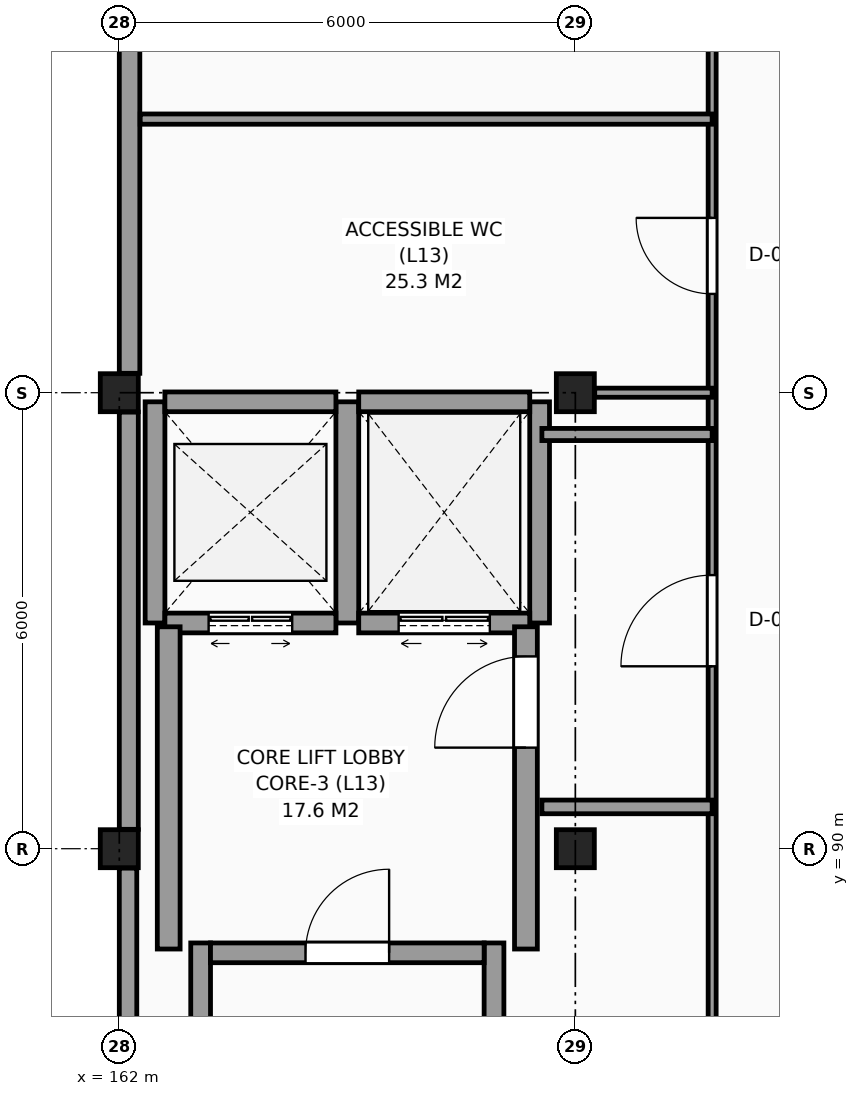
"""IFC4 building model, lengths in metres.
Left out: names, types, materials, properties, quantities, classifications, styles, units other than length and angle.
Written with IfcOpenShell. Run it as: python <this file> out.ifc"""

import sys

from ifc_helpers import new_model, si_unit, direction, frame, frame_2d, origin, origin_2d, place, context, subcontext, project, spatial, rectangle, extrude, element, fill, save


model = new_model("IFC4")
c1 = context("Model", 3, precision=1e-05, world=origin(), true_north=direction((0.0, 1.0)))
c2 = subcontext(c1, "Body", "Model", "MODEL_VIEW")
j1 = project(units=[si_unit("LENGTHUNIT", "METRE"), si_unit("PLANEANGLEUNIT", "RADIAN")], contexts=[c1])
p1 = place(None, origin())
s1 = spatial("IfcSite", under=j1, at=p1, CompositionType="ELEMENT")
p2 = place(p1, origin())
s2 = spatial("IfcBuilding", under=s1, at=p2, CompositionType="ELEMENT")
p3 = place(p2, frame((0.0, 0.0, 51.3)))
s3 = spatial("IfcBuildingStorey", under=s2, at=p3, CompositionType="ELEMENT", Elevation=51.3)
for number, where, z_axis, x_axis in (
    (1, (162.0, 90.0, 0.0), (0.0, 0.0, 1.0), (1.0, 0.0, 0.0)),
    (2, (162.0, 96.0, 0.0), (0.0, 0.0, 1.0), (1.0, 0.0, 0.0)),
    (3, (168.0, 90.0, 0.0), (0.0, 0.0, 1.0), (1.0, 0.0, 0.0)),
    (4, (168.0, 96.0, 0.0), (0.0, 0.0, 1.0), (1.0, 0.0, 0.0)),
):
    element("IfcColumn", number, at=place(p3, frame(where, z_axis=z_axis, x_axis=x_axis)), inside=s3, PredefinedType="COLUMN", context=c2, shape_type="SweptSolid", body=[
        extrude(rectangle(XDim=0.5, YDim=0.5, at=origin_2d()), origin(), (0.0, 0.0, 1.0), 3.3),
    ])
p4 = place(p3, frame((162.135, 101.745, 0.0), z_axis=(0.0, 0.0, 1.0), x_axis=(0.0, -1.0, 0.0)))
e5 = element("IfcWall", 5, at=p4, inside=s3, PredefinedType="SOLIDWALL", context=c2, shape_type="SweptSolid", body=[
    extrude(rectangle(XDim=5.49, YDim=0.27, at=frame_2d((2.745, 0.0))), origin(), (0.0, 0.0, 1.0), 2.46),
])
p5 = place(p3, frame((162.125, 95.745, 0.0), z_axis=(0.0, 0.0, 1.0), x_axis=(0.0, -1.0, 0.0)))
e6 = element("IfcWall", 6, at=p5, inside=s3, PredefinedType="SOLIDWALL", context=c2, shape_type="SweptSolid", body=[
    extrude(rectangle(XDim=5.49, YDim=0.25, at=frame_2d((2.745, 0.0))), origin(), (0.0, 0.0, 1.0), 2.61),
])
p6 = place(p3, frame((162.115, 89.745, 0.0), z_axis=(0.0, 0.0, 1.0), x_axis=(0.0, -1.0, 0.0)))
e7 = element("IfcWall", 7, at=p6, inside=s3, PredefinedType="SOLIDWALL", context=c2, shape_type="SweptSolid", body=[
    extrude(rectangle(XDim=5.49, YDim=0.23, at=frame_2d((2.745, 0.0))), origin(), (0.0, 0.0, 1.0), 2.46),
])
for number, where, z_axis, x_axis in (
    (8, (163.07, 78.04, 0.0), (0.0, 0.0, 1.0), (0.0, 1.0, 0.0)),
    (9, (166.93, 78.04, 0.0), (0.0, 0.0, 1.0), (0.0, 1.0, 0.0)),
):
    element("IfcWall", number, at=place(p3, frame(where, z_axis=z_axis, x_axis=x_axis)), inside=s3, PredefinedType="SHEAR", context=c2, shape_type="SweptSolid", body=[
        extrude(rectangle(XDim=10.72, YDim=0.26, at=frame_2d((5.36, 0.0))), origin(), (0.0, 0.0, 1.0), 3.3),
    ])
p7 = place(p3, frame((163.2, 88.63, 0.0), z_axis=(0.0, 0.0, 1.0), x_axis=(1.0, 0.0, 0.0)))
e10 = element("IfcWall", 10, at=p7, inside=s3, PredefinedType="SHEAR", context=c2, shape_type="SweptSolid", body=[
    extrude(rectangle(XDim=3.6, YDim=0.26, at=frame_2d((1.8, 0.0))), origin(), (0.0, 0.0, 1.0), 3.3),
])
p8 = place(p7, frame((1.25, 0.0, 0.0)))
e11 = element("IfcOpeningElement", 11, at=p8, cuts=e10, PredefinedType="OPENING", context=c2, shape_type="SweptSolid", body=[
    extrude(rectangle(XDim=1.1, YDim=2.15, at=frame_2d((0.55, 1.075))), frame((0.0, 0.14, 0.0), z_axis=(0.0, -1.0, 0.0), x_axis=(1.0, 0.0, 0.0)), (0.0, 0.0, 1.0), 0.28),
])
p9 = place(p3, frame((162.47, 92.97, 0.0), z_axis=(0.0, 0.0, 1.0), x_axis=(0.0, 1.0, 0.0)))
e12 = element("IfcWall", 12, at=p9, inside=s3, PredefinedType="SHEAR", context=c2, shape_type="SweptSolid", body=[
    extrude(rectangle(XDim=2.91, YDim=0.26, at=frame_2d((1.455, 0.0))), origin(), (0.0, 0.0, 1.0), 3.3),
])
p10 = place(p3, frame((165.0, 92.97, 0.0), z_axis=(0.0, 0.0, 1.0), x_axis=(0.0, 1.0, 0.0)))
e13 = element("IfcWall", 13, at=p10, inside=s3, PredefinedType="SHEAR", context=c2, shape_type="SweptSolid", body=[
    extrude(rectangle(XDim=2.91, YDim=0.3, at=frame_2d((1.455, 0.0))), origin(), (0.0, 0.0, 1.0), 3.3),
])
p11 = place(p3, frame((162.6, 95.88, 0.0), z_axis=(0.0, 0.0, 1.0), x_axis=(1.0, 0.0, 0.0)))
e14 = element("IfcWall", 14, at=p11, inside=s3, PredefinedType="SHEAR", context=c2, shape_type="SweptSolid", body=[
    extrude(rectangle(XDim=2.25, YDim=0.26, at=frame_2d((1.125, 0.0))), origin(), (0.0, 0.0, 1.0), 3.3),
])
p12 = place(p3, frame((162.6, 92.97, 0.0), z_axis=(0.0, 0.0, 1.0), x_axis=(1.0, 0.0, 0.0)))
e15 = element("IfcWall", 15, at=p12, inside=s3, PredefinedType="SHEAR", context=c2, shape_type="SweptSolid", body=[
    extrude(rectangle(XDim=2.25, YDim=0.26, at=frame_2d((1.125, 0.0))), origin(), (0.0, 0.0, 1.0), 3.3),
])
p13 = place(p12, frame((0.575, 0.0, 0.0)))
e16 = element("IfcOpeningElement", 16, at=p13, cuts=e15, PredefinedType="OPENING", context=c2, shape_type="SweptSolid", body=[
    extrude(rectangle(XDim=1.1, YDim=2.2, at=frame_2d((0.55, 1.1))), frame((0.0, 0.14, 0.0), z_axis=(0.0, -1.0, 0.0), x_axis=(1.0, 0.0, 0.0)), (0.0, 0.0, 1.0), 0.28),
])
p14 = place(p3, frame((167.53, 92.97, 0.0), z_axis=(0.0, 0.0, 1.0), x_axis=(0.0, 1.0, 0.0)))
e17 = element("IfcWall", 17, at=p14, inside=s3, PredefinedType="SHEAR", context=c2, shape_type="SweptSolid", body=[
    extrude(rectangle(XDim=2.91, YDim=0.26, at=frame_2d((1.455, 0.0))), origin(), (0.0, 0.0, 1.0), 3.3),
])
p15 = place(p3, frame((165.15, 95.88, 0.0), z_axis=(0.0, 0.0, 1.0), x_axis=(1.0, 0.0, 0.0)))
e18 = element("IfcWall", 18, at=p15, inside=s3, PredefinedType="SHEAR", context=c2, shape_type="SweptSolid", body=[
    extrude(rectangle(XDim=2.25, YDim=0.26, at=frame_2d((1.125, 0.0))), origin(), (0.0, 0.0, 1.0), 3.3),
])
p16 = place(p3, frame((165.15, 92.97, 0.0), z_axis=(0.0, 0.0, 1.0), x_axis=(1.0, 0.0, 0.0)))
e19 = element("IfcWall", 19, at=p16, inside=s3, PredefinedType="SHEAR", context=c2, shape_type="SweptSolid", body=[
    extrude(rectangle(XDim=2.25, YDim=0.26, at=frame_2d((1.125, 0.0))), origin(), (0.0, 0.0, 1.0), 3.3),
])
p17 = place(p16, frame((0.525, 0.0, 0.0)))
e20 = element("IfcOpeningElement", 20, at=p17, cuts=e19, PredefinedType="OPENING", context=c2, shape_type="SweptSolid", body=[
    extrude(rectangle(XDim=1.2, YDim=2.25, at=frame_2d((0.6, 1.125))), frame((0.0, 0.14, 0.0), z_axis=(0.0, -1.0, 0.0), x_axis=(1.0, 0.0, 0.0)), (0.0, 0.0, 1.0), 0.28),
])
p18 = place(p3, frame((167.35, 88.68, 0.0), z_axis=(0.0, 0.0, 1.0), x_axis=(0.0, 1.0, 0.0)))
e21 = element("IfcWall", 21, at=p18, inside=s3, PredefinedType="SHEAR", context=c2, shape_type="SweptSolid", body=[
    extrude(rectangle(XDim=4.24, YDim=0.3, at=frame_2d((2.12, 0.0))), origin(), (0.0, 0.0, 1.0), 3.3),
])
p19 = place(p18, frame((2.65, 0.0, 0.0)))
e22 = element("IfcOpeningElement", 22, at=p19, cuts=e21, PredefinedType="OPENING", context=c2, shape_type="SweptSolid", body=[
    extrude(rectangle(XDim=1.2, YDim=2.2, at=frame_2d((0.6, 1.1))), frame((0.0, 0.16, 0.0), z_axis=(0.0, -1.0, 0.0), x_axis=(1.0, 0.0, 0.0)), (0.0, 0.0, 1.0), 0.32),
])
p20 = place(p3, frame((162.65, 88.68, 0.0), z_axis=(0.0, 0.0, 1.0), x_axis=(0.0, 1.0, 0.0)))
e23 = element("IfcWall", 23, at=p20, inside=s3, PredefinedType="SHEAR", context=c2, shape_type="SweptSolid", body=[
    extrude(rectangle(XDim=4.24, YDim=0.3, at=frame_2d((2.12, 0.0))), origin(), (0.0, 0.0, 1.0), 3.3),
])
p21 = place(p3, frame((169.8, 66.215, 0.0), z_axis=(0.0, 0.0, 1.0), x_axis=(0.0, 1.0, 0.0)))
e24 = element("IfcWall", 24, at=p21, inside=s3, PredefinedType="PARTITIONING", context=c2, shape_type="SweptSolid", body=[
    extrude(rectangle(XDim=41.605, YDim=0.105, at=frame_2d((20.802, 0.0))), origin(), (0.0, 0.0, 1.0), 3.06),
])
p22 = place(p21, frame((26.185, 0.0, 0.0)))
e25 = element("IfcOpeningElement", 25, at=p22, cuts=e24, PredefinedType="OPENING", context=c2, shape_type="SweptSolid", body=[
    extrude(rectangle(XDim=1.2, YDim=2.2, at=frame_2d((0.6, 1.1))), frame((0.0, 0.062, 0.0), z_axis=(0.0, -1.0, 0.0), x_axis=(1.0, 0.0, 0.0)), (0.0, 0.0, 1.0), 0.125),
])
p23 = place(p21, frame((8.235, 0.0, 0.0)))
e26 = element("IfcOpeningElement", 26, at=p23, cuts=e24, PredefinedType="OPENING", context=c2, shape_type="SweptSolid", body=[
    extrude(rectangle(XDim=1.1, YDim=2.2, at=frame_2d((0.55, 1.1))), frame((0.0, 0.062, 0.0), z_axis=(0.0, -1.0, 0.0), x_axis=(1.0, 0.0, 0.0)), (0.0, 0.0, 1.0), 0.125),
])
p24 = place(p21, frame((37.735, 0.0, 0.0)))
e27 = element("IfcOpeningElement", 27, at=p24, cuts=e24, PredefinedType="OPENING", context=c2, shape_type="SweptSolid", body=[
    extrude(rectangle(XDim=1.1, YDim=2.2, at=frame_2d((0.55, 1.1))), frame((0.0, 0.062, 0.0), z_axis=(0.0, -1.0, 0.0), x_axis=(1.0, 0.0, 0.0)), (0.0, 0.0, 1.0), 0.125),
])
p25 = place(p21, frame((31.085, 0.0, 0.0)))
e28 = element("IfcOpeningElement", 28, at=p25, cuts=e24, PredefinedType="OPENING", context=c2, shape_type="SweptSolid", body=[
    extrude(rectangle(XDim=1.0, YDim=2.15, at=frame_2d((0.5, 1.075))), frame((0.0, 0.062, 0.0), z_axis=(0.0, -1.0, 0.0), x_axis=(1.0, 0.0, 0.0)), (0.0, 0.0, 1.0), 0.125),
])
p26 = place(p3, frame((167.56, 90.55, 0.0), z_axis=(0.0, 0.0, 1.0), x_axis=(1.0, 0.0, 0.0)))
e29 = element("IfcWall", 29, at=p26, inside=s3, PredefinedType="PARTITIONING", context=c2, shape_type="SweptSolid", body=[
    extrude(rectangle(XDim=2.24, YDim=0.18, at=frame_2d((1.12, 0.0))), origin(), (0.0, 0.0, 1.0), 3.06),
])
p27 = place(p3, frame((167.56, 95.45, 0.0), z_axis=(0.0, 0.0, 1.0), x_axis=(1.0, 0.0, 0.0)))
e30 = element("IfcWall", 30, at=p27, inside=s3, PredefinedType="PARTITIONING", context=c2, shape_type="SweptSolid", body=[
    extrude(rectangle(XDim=2.24, YDim=0.16, at=frame_2d((1.12, 0.0))), origin(), (0.0, 0.0, 1.0), 3.06),
])
p28 = place(p3, frame((168.255, 96.0, 0.0), z_axis=(0.0, 0.0, 1.0), x_axis=(1.0, 0.0, 0.0)))
e31 = element("IfcWall", 31, at=p28, inside=s3, PredefinedType="PARTITIONING", context=c2, shape_type="SweptSolid", body=[
    extrude(rectangle(XDim=1.545, YDim=0.12, at=frame_2d((0.772, 0.0))), origin(), (0.0, 0.0, 1.0), 2.51),
])
p29 = place(p3, frame((162.275, 99.6, 0.0), z_axis=(0.0, 0.0, 1.0), x_axis=(1.0, 0.0, 0.0)))
e32 = element("IfcWall", 32, at=p29, inside=s3, PredefinedType="PARTITIONING", context=c2, shape_type="SweptSolid", body=[
    extrude(rectangle(XDim=7.525, YDim=0.135, at=frame_2d((3.763, 0.0))), origin(), (0.0, 0.0, 1.0), 3.06),
])
p30 = place(p8, origin())
e33 = element("IfcDoor", 33, at=p30, inside=s3, OperationType="SINGLE_SWING_RIGHT", PredefinedType="DOOR", context=c2, shape_type="SweptSolid", body=[
    extrude(rectangle(XDim=1.1, YDim=2.15, at=frame_2d((0.55, 1.075))), frame((0.0, 0.025, 0.0), z_axis=(0.0, -1.0, 0.0), x_axis=(1.0, 0.0, 0.0)), (0.0, 0.0, 1.0), 0.05),
])
fill(e11, e33)
p31 = place(p13, origin())
e34 = element("IfcDoor", 34, at=p31, inside=s3, OperationType="DOUBLE_DOOR_SLIDING", PredefinedType="DOOR", context=c2, shape_type="SweptSolid", body=[
    extrude(rectangle(XDim=1.1, YDim=2.2, at=frame_2d((0.55, 1.1))), frame((0.0, 0.025, 0.0), z_axis=(0.0, -1.0, 0.0), x_axis=(1.0, 0.0, 0.0)), (0.0, 0.0, 1.0), 0.05),
])
fill(e16, e34)
p32 = place(p17, origin())
e35 = element("IfcDoor", 35, at=p32, inside=s3, OperationType="DOUBLE_DOOR_SLIDING", PredefinedType="DOOR", context=c2, shape_type="SweptSolid", body=[
    extrude(rectangle(XDim=1.2, YDim=2.25, at=frame_2d((0.6, 1.125))), frame((0.0, 0.025, 0.0), z_axis=(0.0, -1.0, 0.0), x_axis=(1.0, 0.0, 0.0)), (0.0, 0.0, 1.0), 0.05),
])
fill(e20, e35)
p33 = place(p19, origin())
e36 = element("IfcDoor", 36, at=p33, inside=s3, OperationType="SINGLE_SWING_LEFT", PredefinedType="DOOR", context=c2, shape_type="SweptSolid", body=[
    extrude(rectangle(XDim=1.2, YDim=2.2, at=frame_2d((0.6, 1.1))), frame((0.0, 0.025, 0.0), z_axis=(0.0, -1.0, 0.0), x_axis=(1.0, 0.0, 0.0)), (0.0, 0.0, 1.0), 0.05),
])
fill(e22, e36)
p34 = place(p22, origin())
e37 = element("IfcDoor", 37, at=p34, inside=s3, OperationType="SINGLE_SWING_LEFT", PredefinedType="DOOR", context=c2, shape_type="SweptSolid", body=[
    extrude(rectangle(XDim=1.2, YDim=2.2, at=frame_2d((0.6, 1.1))), frame((0.0, 0.025, 0.0), z_axis=(0.0, -1.0, 0.0), x_axis=(1.0, 0.0, 0.0)), (0.0, 0.0, 1.0), 0.05),
])
fill(e25, e37)
p35 = place(p25, origin())
e38 = element("IfcDoor", 38, at=p35, inside=s3, OperationType="SINGLE_SWING_RIGHT", PredefinedType="DOOR", context=c2, shape_type="SweptSolid", body=[
    extrude(rectangle(XDim=1.0, YDim=2.15, at=frame_2d((0.5, 1.075))), frame((0.0, 0.025, 0.0), z_axis=(0.0, -1.0, 0.0), x_axis=(1.0, 0.0, 0.0)), (0.0, 0.0, 1.0), 0.05),
])
fill(e28, e38)
save(model, sys.argv[1])
